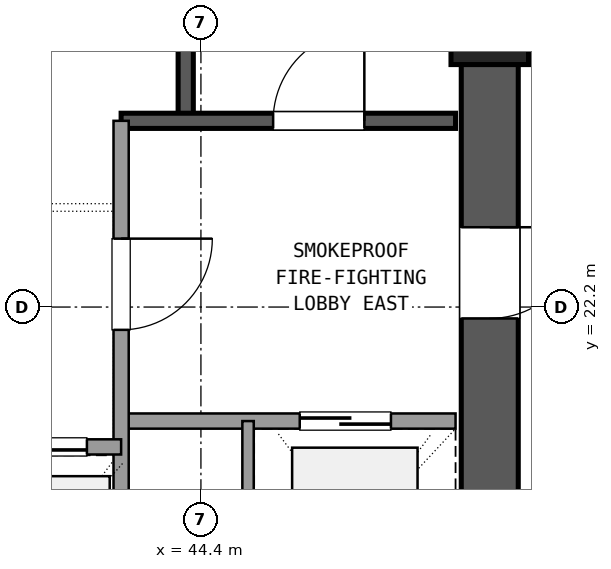
"""IFC4 building model, lengths in metres.
Left out: names, types, materials, properties, quantities, classifications, styles, units other than length and angle.
Written with IfcOpenShell. Run it as: python <this file> out.ifc"""

import sys

from ifc_helpers import new_model, si_unit, direction, frame, frame_2d, origin, origin_2d, place, context, subcontext, project, spatial, rectangle, extrude, element, fill, save


model = new_model("IFC4")
c1 = context("Model", 3, precision=1e-05, world=origin(), true_north=direction((0.0, 1.0)))
c2 = subcontext(c1, "Body", "Model", "MODEL_VIEW")
j1 = project(units=[si_unit("LENGTHUNIT", "METRE"), si_unit("PLANEANGLEUNIT", "RADIAN")], contexts=[c1])
p1 = place(None, origin())
s1 = spatial("IfcSite", under=j1, at=p1, CompositionType="ELEMENT")
p2 = place(p1, origin())
s2 = spatial("IfcBuilding", under=s1, at=p2, CompositionType="ELEMENT")
p3 = place(p2, frame((0.0, 0.0, 84.78)))
s3 = spatial("IfcBuildingStorey", under=s2, at=p3, CompositionType="ELEMENT", Elevation=84.78)
p4 = place(p3, frame((48.2, 25.9, 0.0), z_axis=(0.0, 0.0, 1.0), x_axis=(1.0, 0.0, 0.0)))
e1 = element("IfcColumn", 1, at=p4, inside=s3, PredefinedType="COLUMN", context=c2, shape_type="SweptSolid", body=[
    extrude(rectangle(XDim=1.02, YDim=1.02, at=origin_2d()), origin(), (0.0, 0.0, 1.0), 3.6),
])
p5 = place(p3, frame((48.2, 17.805, 0.0), z_axis=(0.0, 0.0, 1.0), x_axis=(0.0, 1.0, 0.0)))
e2 = element("IfcWall", 2, at=p5, inside=s3, PredefinedType="SHEAR", context=c2, shape_type="SweptSolid", body=[
    extrude(rectangle(XDim=7.59, YDim=0.75, at=frame_2d((3.795, 0.0))), origin(), (0.0, 0.0, 1.0), 3.32),
])
p6 = place(p5, frame((4.245, 0.0, 0.0)))
e3 = element("IfcOpeningElement", 3, at=p6, cuts=e2, PredefinedType="OPENING", context=c2, shape_type="SweptSolid", body=[
    extrude(rectangle(XDim=1.2, YDim=2.15, at=frame_2d((0.6, 1.075))), frame((0.0, 0.385, 0.0), z_axis=(0.0, -1.0, 0.0), x_axis=(1.0, 0.0, 0.0)), (0.0, 0.0, 1.0), 0.77),
])
p7 = place(p3, frame((44.2, 24.65, 0.0), z_axis=(0.0, 0.0, 1.0), x_axis=(0.0, 1.0, 0.0)))
e4 = element("IfcWall", 4, at=p7, inside=s3, PredefinedType="SHEAR", context=c2, shape_type="SweptSolid", body=[
    extrude(rectangle(XDim=9.4, YDim=0.2, at=frame_2d((4.7, 0.0))), origin(), (0.0, 0.0, 1.0), 3.32),
])
p8 = place(p3, frame((43.35, 24.65, 0.0), z_axis=(0.0, 0.0, 1.0), x_axis=(1.0, 0.0, 0.0)))
e5 = element("IfcWall", 5, at=p8, inside=s3, PredefinedType="SHEAR", context=c2, shape_type="SweptSolid", body=[
    extrude(rectangle(XDim=4.4, YDim=0.2, at=frame_2d((2.2, 0.0))), origin(), (0.0, 0.0, 1.0), 3.32),
])
p9 = place(p8, frame((2.0, 0.0, 0.0)))
e6 = element("IfcOpeningElement", 6, at=p9, cuts=e5, PredefinedType="OPENING", context=c2, shape_type="SweptSolid", body=[
    extrude(rectangle(XDim=1.2, YDim=2.15, at=frame_2d((0.6, 1.075))), frame((0.0, 0.11, 0.0), z_axis=(0.0, -1.0, 0.0), x_axis=(1.0, 0.0, 0.0)), (0.0, 0.0, 1.0), 0.22),
])
p10 = place(p3, frame((43.35, 20.7, 0.0), z_axis=(0.0, 0.0, 1.0), x_axis=(1.0, 0.0, 0.0)))
e7 = element("IfcWall", 7, at=p10, inside=s3, PredefinedType="SOLIDWALL", context=c2, shape_type="SweptSolid", body=[
    extrude(rectangle(XDim=4.4, YDim=0.2, at=frame_2d((2.2, 0.0))), origin(), (0.0, 0.0, 1.0), 2.61),
])
p11 = place(p10, frame((2.35, 0.0, 0.0)))
e8 = element("IfcOpeningElement", 8, at=p11, cuts=e7, PredefinedType="OPENING", context=c2, shape_type="SweptSolid", body=[
    extrude(rectangle(XDim=1.2, YDim=2.15, at=frame_2d((0.6, 1.075))), frame((0.0, 0.11, 0.0), z_axis=(0.0, -1.0, 0.0), x_axis=(1.0, 0.0, 0.0)), (0.0, 0.0, 1.0), 0.22),
])
p12 = place(p3, frame((43.35, 17.75, 0.0), z_axis=(0.0, 0.0, 1.0), x_axis=(0.0, 1.0, 0.0)))
e9 = element("IfcWall", 9, at=p12, inside=s3, PredefinedType="SOLIDWALL", context=c2, shape_type="SweptSolid", body=[
    extrude(rectangle(XDim=6.9, YDim=0.2, at=frame_2d((3.45, 0.0))), origin(), (0.0, 0.0, 1.0), 2.61),
])
p13 = place(p12, frame((4.15, 0.0, 0.0)))
e10 = element("IfcOpeningElement", 10, at=p13, cuts=e9, PredefinedType="OPENING", context=c2, shape_type="SweptSolid", body=[
    extrude(rectangle(XDim=1.2, YDim=2.15, at=frame_2d((0.6, 1.075))), frame((0.0, 0.11, 0.0), z_axis=(0.0, -1.0, 0.0), x_axis=(1.0, 0.0, 0.0)), (0.0, 0.0, 1.0), 0.22),
])
p14 = place(p3, frame((45.02, 17.75, 0.0), z_axis=(0.0, 0.0, 1.0), x_axis=(0.0, 1.0, 0.0)))
e11 = element("IfcWall", 11, at=p14, inside=s3, PredefinedType="PARTITIONING", context=c2, shape_type="SweptSolid", body=[
    extrude(rectangle(XDim=2.95, YDim=0.15, at=frame_2d((1.475, 0.0))), origin(), (0.0, 0.0, 1.0), 2.61),
])
p15 = place(p3, frame((37.25, 20.36, 0.0), z_axis=(0.0, 0.0, 1.0), x_axis=(1.0, 0.0, 0.0)))
e12 = element("IfcWall", 12, at=p15, inside=s3, PredefinedType="SOLIDWALL", context=c2, shape_type="SweptSolid", body=[
    extrude(rectangle(XDim=6.1, YDim=0.2, at=frame_2d((3.05, 0.0))), origin(), (0.0, 0.0, 1.0), 2.61),
])
p16 = place(p15, frame((0.45, 0.0, 0.0)))
e13 = element("IfcOpeningElement", 13, at=p16, cuts=e12, PredefinedType="OPENING", context=c2, shape_type="SweptSolid", body=[
    extrude(rectangle(XDim=1.1, YDim=2.15, at=frame_2d((0.55, 1.075))), frame((0.0, 0.11, 0.0), z_axis=(0.0, -1.0, 0.0), x_axis=(1.0, 0.0, 0.0)), (0.0, 0.0, 1.0), 0.22),
])
p17 = place(p15, frame((2.5, 0.0, 0.0)))
e14 = element("IfcOpeningElement", 14, at=p17, cuts=e12, PredefinedType="OPENING", context=c2, shape_type="SweptSolid", body=[
    extrude(rectangle(XDim=1.1, YDim=2.15, at=frame_2d((0.55, 1.075))), frame((0.0, 0.11, 0.0), z_axis=(0.0, -1.0, 0.0), x_axis=(1.0, 0.0, 0.0)), (0.0, 0.0, 1.0), 0.22),
])
p18 = place(p15, frame((4.55, 0.0, 0.0)))
e15 = element("IfcOpeningElement", 15, at=p18, cuts=e12, PredefinedType="OPENING", context=c2, shape_type="SweptSolid", body=[
    extrude(rectangle(XDim=1.1, YDim=2.15, at=frame_2d((0.55, 1.075))), frame((0.0, 0.11, 0.0), z_axis=(0.0, -1.0, 0.0), x_axis=(1.0, 0.0, 0.0)), (0.0, 0.0, 1.0), 0.22),
])
p19 = place(p9, origin())
e16 = element("IfcDoor", 16, at=p19, inside=s3, OperationType="SINGLE_SWING_RIGHT", PredefinedType="DOOR", context=c2, shape_type="SweptSolid", body=[
    extrude(rectangle(XDim=1.2, YDim=2.15, at=frame_2d((0.6, 1.075))), frame((0.0, 0.025, 0.0), z_axis=(0.0, -1.0, 0.0), x_axis=(1.0, 0.0, 0.0)), (0.0, 0.0, 1.0), 0.05),
])
fill(e6, e16)
p20 = place(p11, origin())
e17 = element("IfcDoor", 17, at=p20, inside=s3, OperationType="SLIDING_TO_RIGHT", PredefinedType="DOOR", context=c2, shape_type="SweptSolid", body=[
    extrude(rectangle(XDim=1.2, YDim=2.15, at=frame_2d((0.6, 1.075))), frame((0.0, 0.025, 0.0), z_axis=(0.0, -1.0, 0.0), x_axis=(1.0, 0.0, 0.0)), (0.0, 0.0, 1.0), 0.05),
])
fill(e8, e17)
p21 = place(p13, frame((1.2, 0.0, 0.0), z_axis=(0.0, 0.0, 1.0), x_axis=(-1.0, 0.0, 0.0)))
e18 = element("IfcDoor", 18, at=p21, inside=s3, OperationType="SINGLE_SWING_RIGHT", PredefinedType="DOOR", context=c2, shape_type="SweptSolid", body=[
    extrude(rectangle(XDim=1.2, YDim=2.15, at=frame_2d((0.6, 1.075))), frame((0.0, 0.025, 0.0), z_axis=(0.0, -1.0, 0.0), x_axis=(1.0, 0.0, 0.0)), (0.0, 0.0, 1.0), 0.05),
])
fill(e10, e18)
p22 = place(p6, frame((1.2, 0.0, 0.0), z_axis=(0.0, 0.0, 1.0), x_axis=(-1.0, 0.0, 0.0)))
e19 = element("IfcDoor", 19, at=p22, inside=s3, OperationType="SINGLE_SWING_RIGHT", PredefinedType="DOOR", context=c2, shape_type="SweptSolid", body=[
    extrude(rectangle(XDim=1.2, YDim=2.15, at=frame_2d((0.6, 1.075))), frame((0.0, 0.025, 0.0), z_axis=(0.0, -1.0, 0.0), x_axis=(1.0, 0.0, 0.0)), (0.0, 0.0, 1.0), 0.05),
])
fill(e3, e19)
p23 = place(p18, origin())
e20 = element("IfcDoor", 20, at=p23, inside=s3, OperationType="SLIDING_TO_LEFT", PredefinedType="DOOR", context=c2, shape_type="SweptSolid", body=[
    extrude(rectangle(XDim=1.1, YDim=2.15, at=frame_2d((0.55, 1.075))), frame((0.0, 0.025, 0.0), z_axis=(0.0, -1.0, 0.0), x_axis=(1.0, 0.0, 0.0)), (0.0, 0.0, 1.0), 0.05),
])
fill(e15, e20)
save(model, sys.argv[1])
